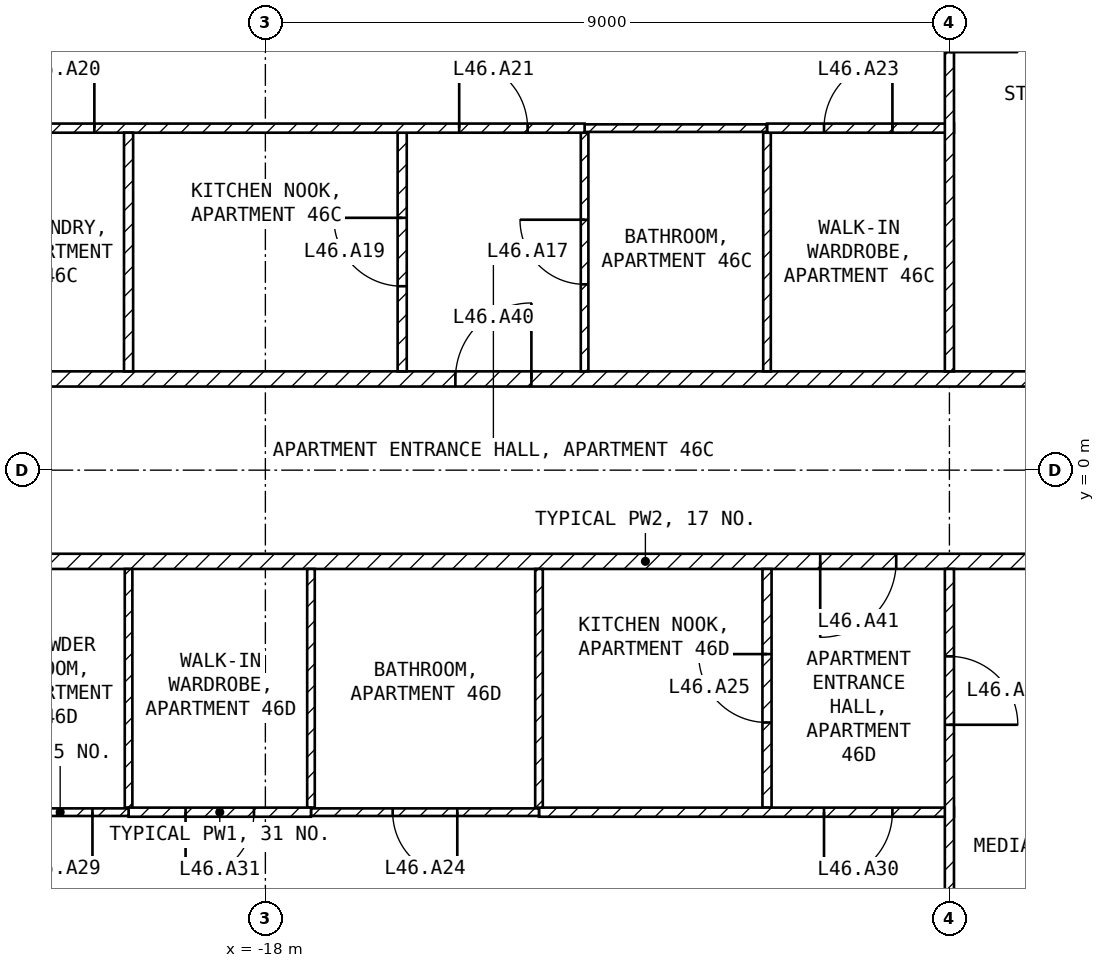
"""IFC4 building model, lengths in metres.
Left out: names, types, materials, properties, quantities, classifications, styles, units other than length and angle.
Written with IfcOpenShell. Run it as: python <this file> out.ifc"""

import sys

from ifc_helpers import new_model, si_unit, direction, frame, frame_2d, origin, place, context, subcontext, project, spatial, rectangle, extrude, element, fill, save


model = new_model("IFC4")
c1 = context("Model", 3, precision=1e-05, world=origin(), true_north=direction((0.0, 1.0)))
c2 = subcontext(c1, "Body", "Model", "MODEL_VIEW")
j1 = project(units=[si_unit("LENGTHUNIT", "METRE"), si_unit("PLANEANGLEUNIT", "RADIAN")], contexts=[c1])
p1 = place(None, origin())
s1 = spatial("IfcSite", under=j1, at=p1, CompositionType="ELEMENT")
p2 = place(p1, origin())
s2 = spatial("IfcBuilding", under=s1, at=p2, CompositionType="ELEMENT")
p3 = place(p2, frame((0.0, 0.0, 187.6)))
s3 = spatial("IfcBuildingStorey", under=s2, at=p3, CompositionType="ELEMENT", Elevation=187.6)
p4 = place(p3, frame((-21.6, 1.2, 0.0), z_axis=(0.0, 0.0, 1.0), x_axis=(1.0, 0.0, 0.0)))
e1 = element("IfcWall", 1, at=p4, inside=s3, PredefinedType="PARTITIONING", context=c2, shape_type="SweptSolid", body=[
    extrude(rectangle(XDim=17.2, YDim=0.2, at=frame_2d((8.6, 0.0))), origin(), (0.0, 0.0, 1.0), 3.25),
])
p5 = place(p4, frame((6.1, 0.0, 0.0)))
e2 = element("IfcOpeningElement", 2, at=p5, cuts=e1, PredefinedType="OPENING", context=c2, shape_type="SweptSolid", body=[
    extrude(rectangle(XDim=1.0, YDim=2.1, at=frame_2d((0.5, 1.05))), frame((0.0, 0.11, 0.0), z_axis=(0.0, -1.0, 0.0), x_axis=(1.0, 0.0, 0.0)), (0.0, 0.0, 1.0), 0.22),
])
p6 = place(p3, frame((-4.4, -1.2, 0.0), z_axis=(0.0, 0.0, 1.0), x_axis=(-1.0, 0.0, 0.0)))
e3 = element("IfcWall", 3, at=p6, inside=s3, PredefinedType="PARTITIONING", context=c2, shape_type="SweptSolid", body=[
    extrude(rectangle(XDim=17.2, YDim=0.2, at=frame_2d((8.6, 0.0))), origin(), (0.0, 0.0, 1.0), 3.25),
])
p7 = place(p6, frame((5.3, 0.0, 0.0)))
e4 = element("IfcOpeningElement", 4, at=p7, cuts=e3, PredefinedType="OPENING", context=c2, shape_type="SweptSolid", body=[
    extrude(rectangle(XDim=1.0, YDim=2.1, at=frame_2d((0.5, 1.05))), frame((0.0, 0.11, 0.0), z_axis=(0.0, -1.0, 0.0), x_axis=(1.0, 0.0, 0.0)), (0.0, 0.0, 1.0), 0.22),
])
p8 = place(p3, frame((-11.4, 1.3, 0.0), z_axis=(0.0, 0.0, 1.0), x_axis=(0.0, 1.0, 0.0)))
e5 = element("IfcWall", 5, at=p8, inside=s3, PredefinedType="PARTITIONING", context=c2, shape_type="SweptSolid", body=[
    extrude(rectangle(XDim=3.14, YDim=0.1, at=frame_2d((1.57, 0.0))), origin(), (0.0, 0.0, 1.0), 3.25),
])
p9 = place(p3, frame((-11.4, 4.5, 0.0), z_axis=(0.0, 0.0, 1.0), x_axis=(1.0, 0.0, 0.0)))
e6 = element("IfcWall", 6, at=p9, inside=s3, PredefinedType="PARTITIONING", context=c2, shape_type="SweptSolid", body=[
    extrude(rectangle(XDim=2.46, YDim=0.12, at=frame_2d((1.23, 0.0))), origin(), (0.0, 0.0, 1.0), 3.25),
])
p10 = place(p9, frame((0.75, 0.0, 0.0)))
e7 = element("IfcOpeningElement", 7, at=p10, cuts=e6, PredefinedType="OPENING", context=c2, shape_type="SweptSolid", body=[
    extrude(rectangle(XDim=0.9, YDim=2.1, at=frame_2d((0.45, 1.05))), frame((0.0, 0.07, 0.0), z_axis=(0.0, -1.0, 0.0), x_axis=(1.0, 0.0, 0.0)), (0.0, 0.0, 1.0), 0.14),
])
p11 = place(p3, frame((-9.0, 8.92, 0.0), z_axis=(0.0, 0.0, 1.0), x_axis=(0.0, -1.0, 0.0)))
e8 = element("IfcWall", 8, at=p11, inside=s3, PredefinedType="PARTITIONING", context=c2, shape_type="SweptSolid", body=[
    extrude(rectangle(XDim=7.62, YDim=0.12, at=frame_2d((3.81, 0.0))), origin(), (0.0, 0.0, 1.0), 3.25),
])
p12 = place(p11, frame((2.52, 0.0, 0.0)))
e9 = element("IfcOpeningElement", 9, at=p12, cuts=e8, PredefinedType="OPENING", context=c2, shape_type="SweptSolid", body=[
    extrude(rectangle(XDim=0.9, YDim=2.1, at=frame_2d((0.45, 1.05))), frame((0.0, 0.07, 0.0), z_axis=(0.0, -1.0, 0.0), x_axis=(1.0, 0.0, 0.0)), (0.0, 0.0, 1.0), 0.14),
])
p13 = place(p3, frame((-13.8, 1.3, 0.0), z_axis=(0.0, 0.0, 1.0), x_axis=(0.0, 1.0, 0.0)))
e10 = element("IfcWall", 10, at=p13, inside=s3, PredefinedType="PARTITIONING", context=c2, shape_type="SweptSolid", body=[
    extrude(rectangle(XDim=3.14, YDim=0.1, at=frame_2d((1.57, 0.0))), origin(), (0.0, 0.0, 1.0), 3.25),
])
p14 = place(p13, frame((1.145, 0.0, 0.0)))
e11 = element("IfcOpeningElement", 11, at=p14, cuts=e10, PredefinedType="OPENING", context=c2, shape_type="SweptSolid", body=[
    extrude(rectangle(XDim=0.85, YDim=2.1, at=frame_2d((0.425, 1.05))), frame((0.0, 0.06, 0.0), z_axis=(0.0, -1.0, 0.0), x_axis=(1.0, 0.0, 0.0)), (0.0, 0.0, 1.0), 0.12),
])
p15 = place(p3, frame((-13.8, 4.5, 0.0), z_axis=(0.0, 0.0, 1.0), x_axis=(1.0, 0.0, 0.0)))
e12 = element("IfcWall", 12, at=p15, inside=s3, PredefinedType="PARTITIONING", context=c2, shape_type="SweptSolid", body=[
    extrude(rectangle(XDim=2.4, YDim=0.1, at=frame_2d((1.2, 0.0))), origin(), (0.0, 0.0, 1.0), 3.25),
])
p16 = place(p3, frame((-16.2, 1.3, 0.0), z_axis=(0.0, 0.0, 1.0), x_axis=(0.0, 1.0, 0.0)))
e13 = element("IfcWall", 13, at=p16, inside=s3, PredefinedType="PARTITIONING", context=c2, shape_type="SweptSolid", body=[
    extrude(rectangle(XDim=3.14, YDim=0.12, at=frame_2d((1.57, 0.0))), origin(), (0.0, 0.0, 1.0), 3.25),
])
p17 = place(p16, frame((1.12, 0.0, 0.0)))
e14 = element("IfcOpeningElement", 14, at=p17, cuts=e13, PredefinedType="OPENING", context=c2, shape_type="SweptSolid", body=[
    extrude(rectangle(XDim=0.9, YDim=2.1, at=frame_2d((0.45, 1.05))), frame((0.0, 0.07, 0.0), z_axis=(0.0, -1.0, 0.0), x_axis=(1.0, 0.0, 0.0)), (0.0, 0.0, 1.0), 0.14),
])
p18 = place(p3, frame((-21.6, 4.5, 0.0), z_axis=(0.0, 0.0, 1.0), x_axis=(1.0, 0.0, 0.0)))
e15 = element("IfcWall", 15, at=p18, inside=s3, PredefinedType="PARTITIONING", context=c2, shape_type="SweptSolid", body=[
    extrude(rectangle(XDim=7.8, YDim=0.12, at=frame_2d((3.9, 0.0))), origin(), (0.0, 0.0, 1.0), 3.25),
])
p19 = place(p18, frame((0.45, 0.0, 0.0)))
e16 = element("IfcOpeningElement", 16, at=p19, cuts=e15, PredefinedType="OPENING", context=c2, shape_type="SweptSolid", body=[
    extrude(rectangle(XDim=0.9, YDim=2.1, at=frame_2d((0.45, 1.05))), frame((0.0, 0.07, 0.0), z_axis=(0.0, -1.0, 0.0), x_axis=(1.0, 0.0, 0.0)), (0.0, 0.0, 1.0), 0.14),
])
p20 = place(p18, frame((6.15, 0.0, 0.0)))
e17 = element("IfcOpeningElement", 17, at=p20, cuts=e15, PredefinedType="OPENING", context=c2, shape_type="SweptSolid", body=[
    extrude(rectangle(XDim=0.9, YDim=2.1, at=frame_2d((0.45, 1.05))), frame((0.0, 0.07, 0.0), z_axis=(0.0, -1.0, 0.0), x_axis=(1.0, 0.0, 0.0)), (0.0, 0.0, 1.0), 0.14),
])
p21 = place(p3, frame((-19.8, 1.3, 0.0), z_axis=(0.0, 0.0, 1.0), x_axis=(0.0, 1.0, 0.0)))
e18 = element("IfcWall", 18, at=p21, inside=s3, PredefinedType="PARTITIONING", context=c2, shape_type="SweptSolid", body=[
    extrude(rectangle(XDim=3.14, YDim=0.12, at=frame_2d((1.57, 0.0))), origin(), (0.0, 0.0, 1.0), 3.25),
])
p22 = place(p3, frame((-11.4, -4.44, 0.0), z_axis=(0.0, 0.0, 1.0), x_axis=(0.0, 1.0, 0.0)))
e19 = element("IfcWall", 19, at=p22, inside=s3, PredefinedType="PARTITIONING", context=c2, shape_type="SweptSolid", body=[
    extrude(rectangle(XDim=3.14, YDim=0.12, at=frame_2d((1.57, 0.0))), origin(), (0.0, 0.0, 1.0), 3.25),
])
p23 = place(p22, frame((1.12, 0.0, 0.0)))
e20 = element("IfcOpeningElement", 20, at=p23, cuts=e19, PredefinedType="OPENING", context=c2, shape_type="SweptSolid", body=[
    extrude(rectangle(XDim=0.9, YDim=2.1, at=frame_2d((0.45, 1.05))), frame((0.0, 0.07, 0.0), z_axis=(0.0, -1.0, 0.0), x_axis=(1.0, 0.0, 0.0)), (0.0, 0.0, 1.0), 0.14),
])
p24 = place(p3, frame((-8.94, -4.5, 0.0), z_axis=(0.0, 0.0, 1.0), x_axis=(-1.0, 0.0, 0.0)))
e21 = element("IfcWall", 21, at=p24, inside=s3, PredefinedType="PARTITIONING", context=c2, shape_type="SweptSolid", body=[
    extrude(rectangle(XDim=5.46, YDim=0.12, at=frame_2d((2.73, 0.0))), origin(), (0.0, 0.0, 1.0), 3.25),
])
p25 = place(p24, frame((0.81, 0.0, 0.0)))
e22 = element("IfcOpeningElement", 22, at=p25, cuts=e21, PredefinedType="OPENING", context=c2, shape_type="SweptSolid", body=[
    extrude(rectangle(XDim=0.9, YDim=2.1, at=frame_2d((0.45, 1.05))), frame((0.0, 0.07, 0.0), z_axis=(0.0, -1.0, 0.0), x_axis=(1.0, 0.0, 0.0)), (0.0, 0.0, 1.0), 0.14),
])
p26 = place(p3, frame((-9.0, -1.3, 0.0), z_axis=(0.0, 0.0, 1.0), x_axis=(0.0, -1.0, 0.0)))
e23 = element("IfcWall", 23, at=p26, inside=s3, PredefinedType="PARTITIONING", context=c2, shape_type="SweptSolid", body=[
    extrude(rectangle(XDim=7.62, YDim=0.12, at=frame_2d((3.81, 0.0))), origin(), (0.0, 0.0, 1.0), 3.25),
])
p27 = place(p26, frame((1.15, 0.0, 0.0)))
e24 = element("IfcOpeningElement", 24, at=p27, cuts=e23, PredefinedType="OPENING", context=c2, shape_type="SweptSolid", body=[
    extrude(rectangle(XDim=0.9, YDim=2.1, at=frame_2d((0.45, 1.05))), frame((0.0, 0.07, 0.0), z_axis=(0.0, -1.0, 0.0), x_axis=(1.0, 0.0, 0.0)), (0.0, 0.0, 1.0), 0.14),
])
for number, where, z_axis, x_axis in (
    (25, (-14.4, -4.44, 0.0), (0.0, 0.0, 1.0), (0.0, 1.0, 0.0)),
    (26, (-17.4, -4.44, 0.0), (0.0, 0.0, 1.0), (0.0, 1.0, 0.0)),
):
    element("IfcWall", number, at=place(p3, frame(where, z_axis=z_axis, x_axis=x_axis)), inside=s3, PredefinedType="PARTITIONING", context=c2, shape_type="SweptSolid", body=[
        extrude(rectangle(XDim=3.14, YDim=0.1, at=frame_2d((1.57, 0.0))), origin(), (0.0, 0.0, 1.0), 3.25),
    ])
p28 = place(p3, frame((-14.4, -4.5, 0.0), z_axis=(0.0, 0.0, 1.0), x_axis=(-1.0, 0.0, 0.0)))
e27 = element("IfcWall", 27, at=p28, inside=s3, PredefinedType="PARTITIONING", context=c2, shape_type="SweptSolid", body=[
    extrude(rectangle(XDim=3.0, YDim=0.1, at=frame_2d((1.5, 0.0))), origin(), (0.0, 0.0, 1.0), 3.25),
])
p29 = place(p28, frame((1.075, 0.0, 0.0)))
e28 = element("IfcOpeningElement", 28, at=p29, cuts=e27, PredefinedType="OPENING", context=c2, shape_type="SweptSolid", body=[
    extrude(rectangle(XDim=0.85, YDim=2.1, at=frame_2d((0.425, 1.05))), frame((0.0, 0.06, 0.0), z_axis=(0.0, -1.0, 0.0), x_axis=(1.0, 0.0, 0.0)), (0.0, 0.0, 1.0), 0.12),
])
p30 = place(p3, frame((-19.8, -4.44, 0.0), z_axis=(0.0, 0.0, 1.0), x_axis=(0.0, 1.0, 0.0)))
e29 = element("IfcWall", 29, at=p30, inside=s3, PredefinedType="PARTITIONING", context=c2, shape_type="SweptSolid", body=[
    extrude(rectangle(XDim=3.14, YDim=0.1, at=frame_2d((1.57, 0.0))), origin(), (0.0, 0.0, 1.0), 3.25),
])
p31 = place(p3, frame((-17.4, -4.5, 0.0), z_axis=(0.0, 0.0, 1.0), x_axis=(-1.0, 0.0, 0.0)))
e30 = element("IfcWall", 30, at=p31, inside=s3, PredefinedType="PARTITIONING", context=c2, shape_type="SweptSolid", body=[
    extrude(rectangle(XDim=2.4, YDim=0.12, at=frame_2d((1.2, 0.0))), origin(), (0.0, 0.0, 1.0), 3.25),
])
p32 = place(p31, frame((0.75, 0.0, 0.0)))
e31 = element("IfcOpeningElement", 31, at=p32, cuts=e30, PredefinedType="OPENING", context=c2, shape_type="SweptSolid", body=[
    extrude(rectangle(XDim=0.9, YDim=2.1, at=frame_2d((0.45, 1.05))), frame((0.0, 0.07, 0.0), z_axis=(0.0, -1.0, 0.0), x_axis=(1.0, 0.0, 0.0)), (0.0, 0.0, 1.0), 0.14),
])
p33 = place(p3, frame((-19.8, -4.5, 0.0), z_axis=(0.0, 0.0, 1.0), x_axis=(-1.0, 0.0, 0.0)))
e32 = element("IfcWall", 32, at=p33, inside=s3, PredefinedType="PARTITIONING", context=c2, shape_type="SweptSolid", body=[
    extrude(rectangle(XDim=1.8, YDim=0.1, at=frame_2d((0.9, 0.0))), origin(), (0.0, 0.0, 1.0), 3.25),
])
p34 = place(p33, frame((0.475, 0.0, 0.0)))
e33 = element("IfcOpeningElement", 33, at=p34, cuts=e32, PredefinedType="OPENING", context=c2, shape_type="SweptSolid", body=[
    extrude(rectangle(XDim=0.85, YDim=2.1, at=frame_2d((0.425, 1.05))), frame((0.0, 0.06, 0.0), z_axis=(0.0, -1.0, 0.0), x_axis=(1.0, 0.0, 0.0)), (0.0, 0.0, 1.0), 0.12),
])
p35 = place(p14, origin())
e34 = element("IfcDoor", 34, at=p35, inside=s3, OperationType="SINGLE_SWING_RIGHT", PredefinedType="DOOR", context=c2, shape_type="SweptSolid", body=[
    extrude(rectangle(XDim=0.85, YDim=2.1, at=frame_2d((0.425, 1.05))), frame((0.0, 0.025, 0.0), z_axis=(0.0, -1.0, 0.0), x_axis=(1.0, 0.0, 0.0)), (0.0, 0.0, 1.0), 0.05),
])
fill(e11, e34)
p36 = place(p17, origin())
e35 = element("IfcDoor", 35, at=p36, inside=s3, OperationType="SINGLE_SWING_RIGHT", PredefinedType="DOOR", context=c2, shape_type="SweptSolid", body=[
    extrude(rectangle(XDim=0.9, YDim=2.1, at=frame_2d((0.45, 1.05))), frame((0.0, 0.025, 0.0), z_axis=(0.0, -1.0, 0.0), x_axis=(1.0, 0.0, 0.0)), (0.0, 0.0, 1.0), 0.05),
])
fill(e14, e35)
p37 = place(p19, origin())
e36 = element("IfcDoor", 36, at=p37, inside=s3, OperationType="SINGLE_SWING_RIGHT", PredefinedType="DOOR", context=c2, shape_type="SweptSolid", body=[
    extrude(rectangle(XDim=0.9, YDim=2.1, at=frame_2d((0.45, 1.05))), frame((0.0, 0.025, 0.0), z_axis=(0.0, -1.0, 0.0), x_axis=(1.0, 0.0, 0.0)), (0.0, 0.0, 1.0), 0.05),
])
fill(e16, e36)
p38 = place(p20, origin())
e37 = element("IfcDoor", 37, at=p38, inside=s3, OperationType="SINGLE_SWING_LEFT", PredefinedType="DOOR", context=c2, shape_type="SweptSolid", body=[
    extrude(rectangle(XDim=0.9, YDim=2.1, at=frame_2d((0.45, 1.05))), frame((0.0, 0.025, 0.0), z_axis=(0.0, -1.0, 0.0), x_axis=(1.0, 0.0, 0.0)), (0.0, 0.0, 1.0), 0.05),
])
fill(e17, e37)
p39 = place(p10, origin())
e38 = element("IfcDoor", 38, at=p39, inside=s3, OperationType="SINGLE_SWING_RIGHT", PredefinedType="DOOR", context=c2, shape_type="SweptSolid", body=[
    extrude(rectangle(XDim=0.9, YDim=2.1, at=frame_2d((0.45, 1.05))), frame((0.0, 0.025, 0.0), z_axis=(0.0, -1.0, 0.0), x_axis=(1.0, 0.0, 0.0)), (0.0, 0.0, 1.0), 0.05),
])
fill(e7, e38)
p40 = place(p29, origin())
e39 = element("IfcDoor", 39, at=p40, inside=s3, OperationType="SINGLE_SWING_LEFT", PredefinedType="DOOR", context=c2, shape_type="SweptSolid", body=[
    extrude(rectangle(XDim=0.85, YDim=2.1, at=frame_2d((0.425, 1.05))), frame((0.0, 0.025, 0.0), z_axis=(0.0, -1.0, 0.0), x_axis=(1.0, 0.0, 0.0)), (0.0, 0.0, 1.0), 0.05),
])
fill(e28, e39)
p41 = place(p23, origin())
e40 = element("IfcDoor", 40, at=p41, inside=s3, OperationType="SINGLE_SWING_RIGHT", PredefinedType="DOOR", context=c2, shape_type="SweptSolid", body=[
    extrude(rectangle(XDim=0.9, YDim=2.1, at=frame_2d((0.45, 1.05))), frame((0.0, 0.025, 0.0), z_axis=(0.0, -1.0, 0.0), x_axis=(1.0, 0.0, 0.0)), (0.0, 0.0, 1.0), 0.05),
])
fill(e20, e40)
p42 = place(p27, origin())
e41 = element("IfcDoor", 41, at=p42, inside=s3, OperationType="SINGLE_SWING_RIGHT", PredefinedType="DOOR", context=c2, shape_type="SweptSolid", body=[
    extrude(rectangle(XDim=0.9, YDim=2.1, at=frame_2d((0.45, 1.05))), frame((0.0, 0.025, 0.0), z_axis=(0.0, -1.0, 0.0), x_axis=(1.0, 0.0, 0.0)), (0.0, 0.0, 1.0), 0.05),
])
fill(e24, e41)
p43 = place(p34, origin())
e42 = element("IfcDoor", 42, at=p43, inside=s3, OperationType="SINGLE_SWING_LEFT", PredefinedType="DOOR", context=c2, shape_type="SweptSolid", body=[
    extrude(rectangle(XDim=0.85, YDim=2.1, at=frame_2d((0.425, 1.05))), frame((0.0, 0.025, 0.0), z_axis=(0.0, -1.0, 0.0), x_axis=(1.0, 0.0, 0.0)), (0.0, 0.0, 1.0), 0.05),
])
fill(e33, e42)
p44 = place(p25, origin())
e43 = element("IfcDoor", 43, at=p44, inside=s3, OperationType="SINGLE_SWING_RIGHT", PredefinedType="DOOR", context=c2, shape_type="SweptSolid", body=[
    extrude(rectangle(XDim=0.9, YDim=2.1, at=frame_2d((0.45, 1.05))), frame((0.0, 0.025, 0.0), z_axis=(0.0, -1.0, 0.0), x_axis=(1.0, 0.0, 0.0)), (0.0, 0.0, 1.0), 0.05),
])
fill(e22, e43)
p45 = place(p32, origin())
e44 = element("IfcDoor", 44, at=p45, inside=s3, OperationType="SINGLE_SWING_RIGHT", PredefinedType="DOOR", context=c2, shape_type="SweptSolid", body=[
    extrude(rectangle(XDim=0.9, YDim=2.1, at=frame_2d((0.45, 1.05))), frame((0.0, 0.025, 0.0), z_axis=(0.0, -1.0, 0.0), x_axis=(1.0, 0.0, 0.0)), (0.0, 0.0, 1.0), 0.05),
])
fill(e31, e44)
p46 = place(p5, origin())
e45 = element("IfcDoor", 45, at=p46, inside=s3, OperationType="SINGLE_SWING_RIGHT", PredefinedType="DOOR", context=c2, shape_type="SweptSolid", body=[
    extrude(rectangle(XDim=1.0, YDim=2.1, at=frame_2d((0.5, 1.05))), frame((0.0, 0.025, 0.0), z_axis=(0.0, -1.0, 0.0), x_axis=(1.0, 0.0, 0.0)), (0.0, 0.0, 1.0), 0.05),
])
fill(e2, e45)
p47 = place(p7, origin())
e46 = element("IfcDoor", 46, at=p47, inside=s3, OperationType="SINGLE_SWING_RIGHT", PredefinedType="DOOR", context=c2, shape_type="SweptSolid", body=[
    extrude(rectangle(XDim=1.0, YDim=2.1, at=frame_2d((0.5, 1.05))), frame((0.0, 0.025, 0.0), z_axis=(0.0, -1.0, 0.0), x_axis=(1.0, 0.0, 0.0)), (0.0, 0.0, 1.0), 0.05),
])
fill(e4, e46)
save(model, sys.argv[1])
